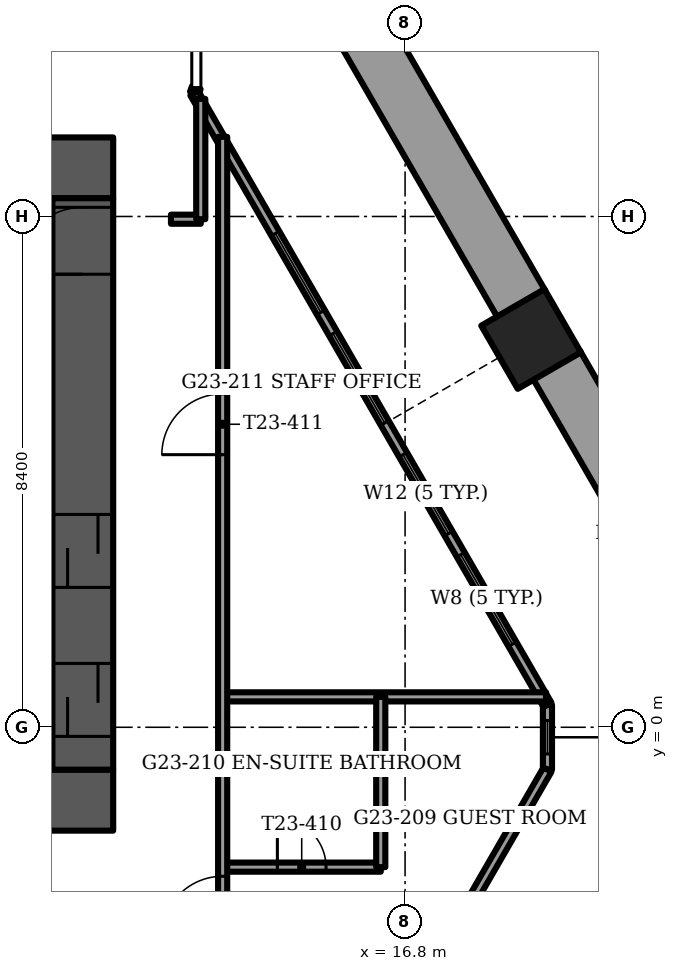
"""IFC4 building model, lengths in metres.
Left out: names, types, materials, properties, quantities, classifications, styles, units other than length and angle.
Written with IfcOpenShell. Run it as: python <this file> out.ifc"""

import sys

from ifc_helpers import new_model, si_unit, direction, frame, frame_2d, origin, origin_2d, place, context, subcontext, project, spatial, rectangle, extrude, element, fill, save


model = new_model("IFC4")
c1 = context("Model", 3, precision=1e-05, world=origin(), true_north=direction((0.0, 1.0)))
c2 = subcontext(c1, "Body", "Model", "MODEL_VIEW")
j1 = project(units=[si_unit("LENGTHUNIT", "METRE"), si_unit("PLANEANGLEUNIT", "RADIAN")], contexts=[c1])
p1 = place(None, origin())
s1 = spatial("IfcSite", under=j1, at=p1, CompositionType="ELEMENT")
p2 = place(p1, origin())
s2 = spatial("IfcBuilding", under=s1, at=p2, CompositionType="ELEMENT")
p3 = place(p2, frame((0.0, 0.0, 93.0)))
s3 = spatial("IfcBuildingStorey", under=s2, at=p3, CompositionType="ELEMENT", Elevation=93.0)
p4 = place(p3, frame((18.872, 6.385, -1.2), z_axis=(0.0, 0.0, 1.0), x_axis=(0.5, -0.866025403784, 0.0)))
e1 = element("IfcColumn", 1, at=p4, inside=s3, PredefinedType="COLUMN", context=c2, shape_type="SweptSolid", body=[
    extrude(rectangle(XDim=1.2, YDim=1.2, at=origin_2d()), origin(), (0.0, 0.0, 1.0), 3.75),
])
p5 = place(p3, frame((-12.0, -1.2, -0.3), z_axis=(0.0, 0.0, 1.0), x_axis=(1.0, 0.0, 0.0)))
e2 = element("IfcWall", 2, at=p5, inside=s3, PredefinedType="SHEAR", context=c2, shape_type="SweptSolid", body=[
    extrude(rectangle(XDim=24.0, YDim=1.0, at=frame_2d((12.0, 0.0))), origin(), (0.0, 0.0, 1.0), 3.75),
])
p6 = place(p5, frame((11.2, 0.0, 0.0)))
e3 = element("IfcOpeningElement", 3, at=p6, cuts=e2, PredefinedType="OPENING", context=c2, shape_type="SweptSolid", body=[
    extrude(rectangle(XDim=1.6, YDim=2.1, at=frame_2d((0.8, 1.05))), frame((0.0, 0.5, 0.0), z_axis=(0.0, -1.0, 0.0), x_axis=(1.0, 0.0, 0.0)), (0.0, 0.0, 1.0), 1.0),
])
p7 = place(p3, frame((-12.0, 9.2, -0.3), z_axis=(0.0, 0.0, 1.0), x_axis=(1.0, 0.0, 0.0)))
e4 = element("IfcWall", 4, at=p7, inside=s3, PredefinedType="SHEAR", context=c2, shape_type="SweptSolid", body=[
    extrude(rectangle(XDim=24.0, YDim=1.0, at=frame_2d((12.0, 0.0))), origin(), (0.0, 0.0, 1.0), 3.75),
])
p8 = place(p7, frame((11.2, 0.0, 0.0)))
e5 = element("IfcOpeningElement", 5, at=p8, cuts=e4, PredefinedType="OPENING", context=c2, shape_type="SweptSolid", body=[
    extrude(rectangle(XDim=1.6, YDim=2.1, at=frame_2d((0.8, 1.05))), frame((0.0, 0.5, 0.0), z_axis=(0.0, -1.0, 0.0), x_axis=(1.0, 0.0, 0.0)), (0.0, 0.0, 1.0), 1.0),
])
p9 = place(p7, frame((5.25, 0.0, 0.0)))
e6 = element("IfcOpeningElement", 6, at=p9, cuts=e4, PredefinedType="OPENING", context=c2, shape_type="SweptSolid", body=[
    extrude(rectangle(XDim=1.1, YDim=2.1, at=frame_2d((0.55, 1.05))), frame((0.0, 0.5, 0.0), z_axis=(0.0, -1.0, 0.0), x_axis=(1.0, 0.0, 0.0)), (0.0, 0.0, 1.0), 1.0),
])
p10 = place(p7, frame((17.65, 0.0, 0.0)))
e7 = element("IfcOpeningElement", 7, at=p10, cuts=e4, PredefinedType="OPENING", context=c2, shape_type="SweptSolid", body=[
    extrude(rectangle(XDim=1.1, YDim=2.1, at=frame_2d((0.55, 1.05))), frame((0.0, 0.5, 0.0), z_axis=(0.0, -1.0, 0.0), x_axis=(1.0, 0.0, 0.0)), (0.0, 0.0, 1.0), 1.0),
])
p11 = place(p3, frame((11.5, -0.7, -0.3), z_axis=(0.0, 0.0, 1.0), x_axis=(0.0, 1.0, 0.0)))
e8 = element("IfcWall", 8, at=p11, inside=s3, PredefinedType="SHEAR", context=c2, shape_type="SweptSolid", body=[
    extrude(rectangle(XDim=9.4, YDim=1.0, at=frame_2d((4.7, 0.0))), origin(), (0.0, 0.0, 1.0), 3.75),
])
p12 = place(p11, frame((8.15, 0.0, 0.0)))
e9 = element("IfcOpeningElement", 9, at=p12, cuts=e8, PredefinedType="OPENING", context=c2, shape_type="SweptSolid", body=[
    extrude(rectangle(XDim=1.1, YDim=2.1, at=frame_2d((0.55, 1.05))), frame((0.0, 0.5, 0.0), z_axis=(0.0, -1.0, 0.0), x_axis=(1.0, 0.0, 0.0)), (0.0, 0.0, 1.0), 1.0),
])
p13 = place(p11, frame((0.55, 0.0, 0.0)))
e10 = element("IfcOpeningElement", 10, at=p13, cuts=e8, PredefinedType="OPENING", context=c2, shape_type="SweptSolid", body=[
    extrude(rectangle(XDim=1.2, YDim=2.1, at=frame_2d((0.6, 1.05))), frame((0.0, 0.5, 0.0), z_axis=(0.0, -1.0, 0.0), x_axis=(1.0, 0.0, 0.0)), (0.0, 0.0, 1.0), 1.0),
])
p14 = place(p11, frame((3.0, 0.0, 0.0)))
e11 = element("IfcOpeningElement", 11, at=p14, cuts=e8, PredefinedType="OPENING", context=c2, shape_type="SweptSolid", body=[
    extrude(rectangle(XDim=1.2, YDim=2.1, at=frame_2d((0.6, 1.05))), frame((0.0, 0.5, 0.0), z_axis=(0.0, -1.0, 0.0), x_axis=(1.0, 0.0, 0.0)), (0.0, 0.0, 1.0), 1.0),
])
p15 = place(p3, frame((19.429, -6.048, 0.0), z_axis=(0.0, 0.0, 1.0), x_axis=(0.500006801911, 0.866021476663, 0.0)))
e12 = element("IfcWall", 12, at=p15, inside=s3, PredefinedType="PARAPET", context=c2, shape_type="SweptSolid", body=[
    extrude(rectangle(XDim=6.144, YDim=0.9, at=frame_2d((3.072, 0.0))), origin(), (0.0, 0.0, 1.0), 1.1),
])
p16 = place(p3, frame((22.501, 0.4, 0.0), z_axis=(0.0, 0.0, 1.0), x_axis=(-0.500011789842, 0.866018596809, 0.0)))
e13 = element("IfcWall", 13, at=p16, inside=s3, PredefinedType="PARAPET", context=c2, shape_type="SweptSolid", body=[
    extrude(rectangle(XDim=6.427, YDim=0.9, at=frame_2d((3.214, 0.0))), origin(), (0.0, 0.0, 1.0), 1.1),
])
p17 = place(p3, frame((18.717, 6.954, 0.0), z_axis=(0.0, 0.0, 1.0), x_axis=(-0.499999023957, 0.866025967302, 0.0)))
e14 = element("IfcWall", 14, at=p17, inside=s3, PredefinedType="PARAPET", context=c2, shape_type="SweptSolid", body=[
    extrude(rectangle(XDim=6.673, YDim=0.9, at=frame_2d((3.337, 0.0))), origin(), (0.0, 0.0, 1.0), 1.1),
])
p18 = place(p3, frame((13.334, -10.755, 0.0), z_axis=(0.0, 0.0, 1.0), x_axis=(0.500002662854, 0.86602386638, 0.0)))
e15 = element("IfcWall", 15, at=p18, inside=s3, PredefinedType="SOLIDWALL", context=c2, shape_type="SweptSolid", body=[
    extrude(rectangle(XDim=11.615, YDim=0.15, at=frame_2d((5.807, 0.0))), origin(), (0.0, 0.0, 1.0), 3.45),
])
p19 = place(p18, frame((0.847, 0.0, 0.15)))
e16 = element("IfcOpeningElement", 16, at=p19, cuts=e15, PredefinedType="OPENING", context=c2, shape_type="SweptSolid", body=[
    extrude(rectangle(XDim=1.7, YDim=2.2, at=frame_2d((0.85, 1.1))), frame((0.0, 0.075, 0.0), z_axis=(0.0, -1.0, 0.0), x_axis=(1.0, 0.0, 0.0)), (0.0, 0.0, 1.0), 0.15),
])
p20 = place(p18, frame((6.322, 0.0, 0.15)))
e17 = element("IfcOpeningElement", 17, at=p20, cuts=e15, PredefinedType="OPENING", context=c2, shape_type="SweptSolid", body=[
    extrude(rectangle(XDim=1.5, YDim=2.2, at=frame_2d((0.75, 1.1))), frame((0.0, 0.075, 0.0), z_axis=(0.0, -1.0, 0.0), x_axis=(1.0, 0.0, 0.0)), (0.0, 0.0, 1.0), 0.15),
])
p21 = place(p3, frame((19.141, 0.369, 0.0), z_axis=(0.0, 0.0, 1.0), x_axis=(-0.500002662854, 0.86602386638, 0.0)))
e18 = element("IfcWall", 18, at=p21, inside=s3, PredefinedType="SOLIDWALL", context=c2, shape_type="SweptSolid", body=[
    extrude(rectangle(XDim=11.615, YDim=0.15, at=frame_2d((5.807, 0.0))), origin(), (0.0, 0.0, 1.0), 3.45),
])
p22 = place(p21, frame((1.151, 0.0, 0.15)))
e19 = element("IfcOpeningElement", 19, at=p22, cuts=e18, PredefinedType="OPENING", context=c2, shape_type="SweptSolid", body=[
    extrude(rectangle(XDim=1.7, YDim=2.2, at=frame_2d((0.85, 1.1))), frame((0.0, 0.075, 0.0), z_axis=(0.0, -1.0, 0.0), x_axis=(1.0, 0.0, 0.0)), (0.0, 0.0, 1.0), 0.15),
])
p23 = place(p21, frame((3.251, 0.0, 0.15)))
e20 = element("IfcOpeningElement", 20, at=p23, cuts=e18, PredefinedType="OPENING", context=c2, shape_type="SweptSolid", body=[
    extrude(rectangle(XDim=1.5, YDim=2.2, at=frame_2d((0.75, 1.1))), frame((0.0, 0.075, 0.0), z_axis=(0.0, -1.0, 0.0), x_axis=(1.0, 0.0, 0.0)), (0.0, 0.0, 1.0), 0.15),
])
p24 = place(p21, frame((5.351, 0.0, 0.15)))
e21 = element("IfcOpeningElement", 21, at=p24, cuts=e18, PredefinedType="OPENING", context=c2, shape_type="SweptSolid", body=[
    extrude(rectangle(XDim=1.7, YDim=2.2, at=frame_2d((0.85, 1.1))), frame((0.0, 0.075, 0.0), z_axis=(0.0, -1.0, 0.0), x_axis=(1.0, 0.0, 0.0)), (0.0, 0.0, 1.0), 0.15),
])
p25 = place(p21, frame((7.451, 0.0, 0.15)))
e22 = element("IfcOpeningElement", 22, at=p25, cuts=e18, PredefinedType="OPENING", context=c2, shape_type="SweptSolid", body=[
    extrude(rectangle(XDim=1.5, YDim=2.2, at=frame_2d((0.75, 1.1))), frame((0.0, 0.075, 0.0), z_axis=(0.0, -1.0, 0.0), x_axis=(1.0, 0.0, 0.0)), (0.0, 0.0, 1.0), 0.15),
])
p26 = place(p3, frame((19.141, -0.696, 0.0), z_axis=(0.0, 0.0, 1.0), x_axis=(0.0, 1.0, 0.0)))
e23 = element("IfcWall", 23, at=p26, inside=s3, PredefinedType="SOLIDWALL", context=c2, shape_type="SweptSolid", body=[
    extrude(rectangle(XDim=1.065, YDim=0.15, at=frame_2d((0.533, 0.0))), origin(), (0.0, 0.0, 1.0), 3.45),
])
p27 = place(p26, frame((0.258, 0.0, 0.15)))
e24 = element("IfcOpeningElement", 24, at=p27, cuts=e23, PredefinedType="OPENING", context=c2, shape_type="SweptSolid", body=[
    extrude(rectangle(XDim=0.55, YDim=2.2, at=frame_2d((0.275, 1.1))), frame((0.0, 0.075, 0.0), z_axis=(0.0, -1.0, 0.0), x_axis=(1.0, 0.0, 0.0)), (0.0, 0.0, 1.0), 0.15),
])
p28 = place(p3, frame((13.334, 10.427, 0.0), z_axis=(0.0, 0.0, 1.0), x_axis=(0.337751931921, 0.941235163221, 0.0)))
e25 = element("IfcWall", 25, at=p28, inside=s3, PredefinedType="SOLIDWALL", context=c2, shape_type="SweptSolid", body=[
    extrude(rectangle(XDim=0.098, YDim=0.15, at=frame_2d((0.049, 0.0))), origin(), (0.0, 0.0, 1.0), 3.45),
])
p29 = place(p3, frame((13.8, -2.3, 0.0), z_axis=(0.0, 0.0, 1.0), x_axis=(1.0, 0.0, 0.0)))
e26 = element("IfcWall", 26, at=p29, inside=s3, PredefinedType="PARTITIONING", context=c2, shape_type="SweptSolid", body=[
    extrude(rectangle(XDim=2.6, YDim=0.15, at=frame_2d((1.3, 0.0))), origin(), (0.0, 0.0, 1.0), 3.45),
])
p30 = place(p29, frame((0.9, 0.0, 0.0)))
e27 = element("IfcOpeningElement", 27, at=p30, cuts=e26, PredefinedType="OPENING", context=c2, shape_type="SweptSolid", body=[
    extrude(rectangle(XDim=0.8, YDim=2.1, at=frame_2d((0.4, 1.05))), frame((0.0, 0.075, 0.0), z_axis=(0.0, -1.0, 0.0), x_axis=(1.0, 0.0, 0.0)), (0.0, 0.0, 1.0), 0.15),
])
p31 = place(p3, frame((13.8, 0.5, 0.0), z_axis=(0.0, 0.0, 1.0), x_axis=(1.0, 0.0, 0.0)))
e28 = element("IfcWall", 28, at=p31, inside=s3, PredefinedType="PARTITIONING", context=c2, shape_type="SweptSolid", body=[
    extrude(rectangle(XDim=5.318, YDim=0.15, at=frame_2d((2.659, 0.0))), origin(), (0.0, 0.0, 1.0), 3.45),
])
p32 = place(p3, frame((12.95, 8.355, 0.0), z_axis=(0.0, 0.0, 1.0), x_axis=(1.0, 0.0, 0.0)))
e29 = element("IfcWall", 29, at=p32, inside=s3, PredefinedType="PARTITIONING", context=c2, shape_type="SweptSolid", body=[
    extrude(rectangle(XDim=0.49, YDim=0.15, at=frame_2d((0.245, 0.0))), origin(), (0.0, 0.0, 1.0), 3.45),
])
p33 = place(p3, frame((16.4, -2.3, 0.0), z_axis=(0.0, 0.0, 1.0), x_axis=(0.0, 1.0, 0.0)))
e30 = element("IfcWall", 30, at=p33, inside=s3, PredefinedType="PARTITIONING", context=c2, shape_type="SweptSolid", body=[
    extrude(rectangle(XDim=2.8, YDim=0.15, at=frame_2d((1.4, 0.0))), origin(), (0.0, 0.0, 1.0), 3.45),
])
p34 = place(p3, frame((13.8, -3.7, 0.0), z_axis=(0.0, 0.0, 1.0), x_axis=(0.0, 1.0, 0.0)))
e31 = element("IfcWall", 31, at=p34, inside=s3, PredefinedType="PARTITIONING", context=c2, shape_type="SweptSolid", body=[
    extrude(rectangle(XDim=13.41, YDim=0.15, at=frame_2d((6.705, 0.0))), origin(), (0.0, 0.0, 1.0), 3.45),
])
p35 = place(p34, frame((0.25, 0.0, 0.0)))
e32 = element("IfcOpeningElement", 32, at=p35, cuts=e31, PredefinedType="OPENING", context=c2, shape_type="SweptSolid", body=[
    extrude(rectangle(XDim=1.0, YDim=2.1, at=frame_2d((0.5, 1.05))), frame((0.0, 0.075, 0.0), z_axis=(0.0, -1.0, 0.0), x_axis=(1.0, 0.0, 0.0)), (0.0, 0.0, 1.0), 0.15),
])
p36 = place(p34, frame((8.183, 0.0, 0.0)))
e33 = element("IfcOpeningElement", 33, at=p36, cuts=e31, PredefinedType="OPENING", context=c2, shape_type="SweptSolid", body=[
    extrude(rectangle(XDim=1.0, YDim=2.1, at=frame_2d((0.5, 1.05))), frame((0.0, 0.075, 0.0), z_axis=(0.0, -1.0, 0.0), x_axis=(1.0, 0.0, 0.0)), (0.0, 0.0, 1.0), 0.15),
])
p37 = place(p3, frame((13.44, 8.355, 0.0), z_axis=(0.0, 0.0, 1.0), x_axis=(0.0, 1.0, 0.0)))
e34 = element("IfcWall", 34, at=p37, inside=s3, PredefinedType="PARTITIONING", context=c2, shape_type="SweptSolid", body=[
    extrude(rectangle(XDim=1.979, YDim=0.15, at=frame_2d((0.99, 0.0))), origin(), (0.0, 0.0, 1.0), 3.45),
])
p38 = place(p22, origin())
e35 = element("IfcWindow", 35, at=p38, inside=s3, PartitioningType="SINGLE_PANEL", PredefinedType="WINDOW", context=c2, shape_type="SweptSolid", body=[
    extrude(rectangle(XDim=1.7, YDim=2.2, at=frame_2d((0.85, 1.1))), frame((0.0, 0.03, 0.0), z_axis=(0.0, -1.0, 0.0), x_axis=(1.0, 0.0, 0.0)), (0.0, 0.0, 1.0), 0.06),
])
fill(e19, e35)
p39 = place(p23, origin())
e36 = element("IfcWindow", 36, at=p39, inside=s3, PartitioningType="SINGLE_PANEL", PredefinedType="WINDOW", context=c2, shape_type="SweptSolid", body=[
    extrude(rectangle(XDim=1.5, YDim=2.2, at=frame_2d((0.75, 1.1))), frame((0.0, 0.03, 0.0), z_axis=(0.0, -1.0, 0.0), x_axis=(1.0, 0.0, 0.0)), (0.0, 0.0, 1.0), 0.06),
])
fill(e20, e36)
p40 = place(p24, origin())
e37 = element("IfcWindow", 37, at=p40, inside=s3, PartitioningType="SINGLE_PANEL", PredefinedType="WINDOW", context=c2, shape_type="SweptSolid", body=[
    extrude(rectangle(XDim=1.7, YDim=2.2, at=frame_2d((0.85, 1.1))), frame((0.0, 0.03, 0.0), z_axis=(0.0, -1.0, 0.0), x_axis=(1.0, 0.0, 0.0)), (0.0, 0.0, 1.0), 0.06),
])
fill(e21, e37)
p41 = place(p25, origin())
e38 = element("IfcWindow", 38, at=p41, inside=s3, PartitioningType="SINGLE_PANEL", PredefinedType="WINDOW", context=c2, shape_type="SweptSolid", body=[
    extrude(rectangle(XDim=1.5, YDim=2.2, at=frame_2d((0.75, 1.1))), frame((0.0, 0.03, 0.0), z_axis=(0.0, -1.0, 0.0), x_axis=(1.0, 0.0, 0.0)), (0.0, 0.0, 1.0), 0.06),
])
fill(e22, e38)
p42 = place(p27, origin())
e39 = element("IfcWindow", 39, at=p42, inside=s3, PartitioningType="SINGLE_PANEL", PredefinedType="WINDOW", context=c2, shape_type="SweptSolid", body=[
    extrude(rectangle(XDim=0.55, YDim=2.2, at=frame_2d((0.275, 1.1))), frame((0.0, 0.03, 0.0), z_axis=(0.0, -1.0, 0.0), x_axis=(1.0, 0.0, 0.0)), (0.0, 0.0, 1.0), 0.06),
])
fill(e24, e39)
p43 = place(p12, origin())
e40 = element("IfcDoor", 40, at=p43, inside=s3, OperationType="SINGLE_SWING_RIGHT", PredefinedType="DOOR", context=c2, shape_type="SweptSolid", body=[
    extrude(rectangle(XDim=1.1, YDim=2.1, at=frame_2d((0.55, 1.05))), frame((0.0, 0.025, 0.0), z_axis=(0.0, -1.0, 0.0), x_axis=(1.0, 0.0, 0.0)), (0.0, 0.0, 1.0), 0.05),
])
fill(e9, e40)
p44 = place(p13, origin())
e41 = element("IfcDoor", 41, at=p44, inside=s3, OperationType="SLIDING_TO_LEFT", PredefinedType="DOOR", context=c2, shape_type="SweptSolid", body=[
    extrude(rectangle(XDim=1.2, YDim=2.1, at=frame_2d((0.6, 1.05))), frame((0.0, 0.025, 0.0), z_axis=(0.0, -1.0, 0.0), x_axis=(1.0, 0.0, 0.0)), (0.0, 0.0, 1.0), 0.05),
])
fill(e10, e41)
p45 = place(p14, origin())
e42 = element("IfcDoor", 42, at=p45, inside=s3, OperationType="SLIDING_TO_LEFT", PredefinedType="DOOR", context=c2, shape_type="SweptSolid", body=[
    extrude(rectangle(XDim=1.2, YDim=2.1, at=frame_2d((0.6, 1.05))), frame((0.0, 0.025, 0.0), z_axis=(0.0, -1.0, 0.0), x_axis=(1.0, 0.0, 0.0)), (0.0, 0.0, 1.0), 0.05),
])
fill(e11, e42)
p46 = place(p35, origin())
e43 = element("IfcDoor", 43, at=p46, inside=s3, OperationType="SINGLE_SWING_LEFT", PredefinedType="DOOR", context=c2, shape_type="SweptSolid", body=[
    extrude(rectangle(XDim=1.0, YDim=2.1, at=frame_2d((0.5, 1.05))), frame((0.0, 0.025, 0.0), z_axis=(0.0, -1.0, 0.0), x_axis=(1.0, 0.0, 0.0)), (0.0, 0.0, 1.0), 0.05),
])
fill(e32, e43)
p47 = place(p30, origin())
e44 = element("IfcDoor", 44, at=p47, inside=s3, OperationType="SINGLE_SWING_LEFT", PredefinedType="DOOR", context=c2, shape_type="SweptSolid", body=[
    extrude(rectangle(XDim=0.8, YDim=2.1, at=frame_2d((0.4, 1.05))), frame((0.0, 0.025, 0.0), z_axis=(0.0, -1.0, 0.0), x_axis=(1.0, 0.0, 0.0)), (0.0, 0.0, 1.0), 0.05),
])
fill(e27, e44)
p48 = place(p36, origin())
e45 = element("IfcDoor", 45, at=p48, inside=s3, OperationType="SINGLE_SWING_LEFT", PredefinedType="DOOR", context=c2, shape_type="SweptSolid", body=[
    extrude(rectangle(XDim=1.0, YDim=2.1, at=frame_2d((0.5, 1.05))), frame((0.0, 0.025, 0.0), z_axis=(0.0, -1.0, 0.0), x_axis=(1.0, 0.0, 0.0)), (0.0, 0.0, 1.0), 0.05),
])
fill(e33, e45)
save(model, sys.argv[1])
